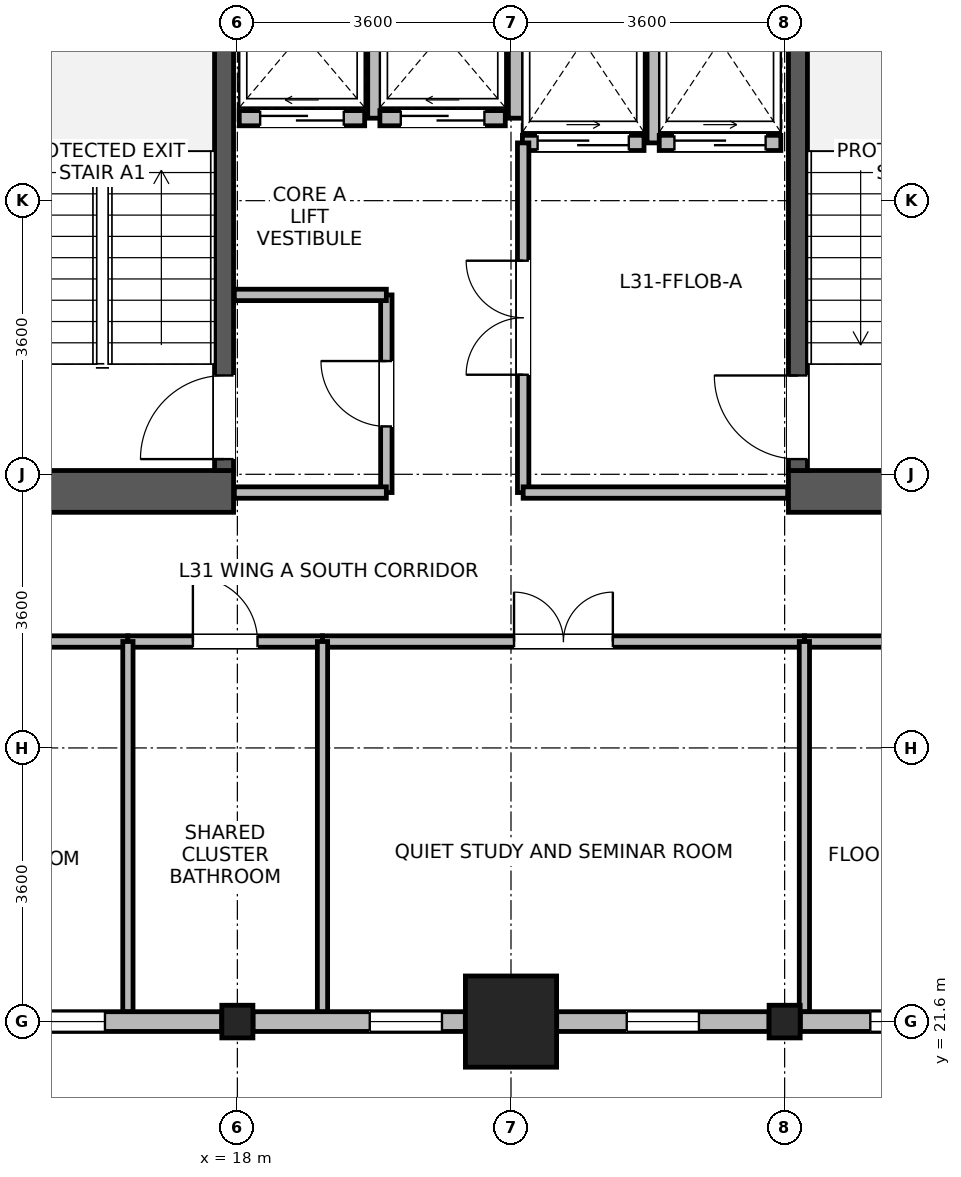
"""IFC4 building model, lengths in metres.
Left out: names, types, materials, properties, quantities, classifications, styles, units other than length and angle.
Written with IfcOpenShell. Run it as: python <this file> out.ifc"""

import sys

from ifc_helpers import new_model, si_unit, direction, frame, frame_2d, origin, origin_2d, place, context, subcontext, project, spatial, rectangle, i_section, extrude, source, transform, mapped, element, fill, save


model = new_model("IFC4")
c1 = context("Model", 3, precision=1e-05, world=origin(), true_north=direction((0.0, 1.0)))
c2 = subcontext(c1, "Body", "Model", "MODEL_VIEW")
j1 = project(units=[si_unit("LENGTHUNIT", "METRE"), si_unit("PLANEANGLEUNIT", "RADIAN")], contexts=[c1])
p1 = place(None, origin())
s1 = spatial("IfcSite", under=j1, at=p1, CompositionType="ELEMENT")
p2 = place(p1, origin())
s2 = spatial("IfcBuilding", under=s1, at=p2, CompositionType="ELEMENT")
p3 = place(p2, frame((0.0, 0.0, 123.0)))
s3 = spatial("IfcBuildingStorey", under=s2, at=p3, CompositionType="ELEMENT", Elevation=123.0)
for number, where, z_axis, x_axis in (
    (1, (14.75, 28.575, 0.0), (0.0, 0.0, 1.0), (1.0, 0.0, 0.0)),
    (2, (25.25, 28.575, 0.0), (0.0, 0.0, 1.0), (1.0, 0.0, 0.0)),
):
    element("IfcWall", number, at=place(p3, frame(where, z_axis=z_axis, x_axis=x_axis)), inside=s3, PredefinedType="SHEAR", context=c2, shape_type="SweptSolid", body=[
        extrude(rectangle(XDim=3.2, YDim=0.55, at=frame_2d((1.6, 0.0))), origin(), (0.0, 0.0, 1.0), 3.45),
    ])
p4 = place(p3, frame((17.825, 28.85, 0.0), z_axis=(0.0, 0.0, 1.0), x_axis=(0.0, 1.0, 0.0)))
e3 = element("IfcWall", 3, at=p4, inside=s3, PredefinedType="SHEAR", context=c2, shape_type="SweptSolid", body=[
    extrude(rectangle(XDim=7.0, YDim=0.25, at=frame_2d((3.5, 0.0))), origin(), (0.0, 0.0, 1.0), 3.45),
])
p5 = place(p4, frame((0.15, 0.0, 0.0)))
e4 = element("IfcOpeningElement", 4, at=p5, cuts=e3, PredefinedType="OPENING", context=c2, shape_type="SweptSolid", body=[
    extrude(rectangle(XDim=1.1, YDim=2.08, at=frame_2d((0.55, 1.04))), frame((0.0, 0.135, 0.0), z_axis=(0.0, -1.0, 0.0), x_axis=(1.0, 0.0, 0.0)), (0.0, 0.0, 1.0), 0.27),
])
p6 = place(p3, frame((25.375, 28.85, 0.0), z_axis=(0.0, 0.0, 1.0), x_axis=(0.0, 1.0, 0.0)))
e5 = element("IfcWall", 5, at=p6, inside=s3, PredefinedType="SHEAR", context=c2, shape_type="SweptSolid", body=[
    extrude(rectangle(XDim=7.0, YDim=0.25, at=frame_2d((3.5, 0.0))), origin(), (0.0, 0.0, 1.0), 3.45),
])
p7 = place(p6, frame((0.15, 0.0, 0.0)))
e6 = element("IfcOpeningElement", 6, at=p7, cuts=e5, PredefinedType="OPENING", context=c2, shape_type="SweptSolid", body=[
    extrude(rectangle(XDim=1.1, YDim=2.08, at=frame_2d((0.55, 1.04))), frame((0.0, 0.135, 0.0), z_axis=(0.0, -1.0, 0.0), x_axis=(1.0, 0.0, 0.0)), (0.0, 0.0, 1.0), 0.27),
])
m1 = source(origin(), c2, "Body", "SweptSolid", [
    extrude(rectangle(XDim=1.2, YDim=1.2, at=origin_2d()), origin(), (0.0, 0.0, 1.0), 3.7),
])
p8 = place(p3, frame((21.6, 21.6, 0.0), z_axis=(0.0, 0.0, 1.0), x_axis=(1.0, 0.0, 0.0)))
e7 = element("IfcColumn", 7, at=p8, inside=s3, PredefinedType="COLUMN", context=c2, shape_type="MappedRepresentation", body=[
    mapped(m1, transform((0.0, 0.0, 0.0), x_axis=(1.0, 0.0, 0.0), y_axis=(0.0, 1.0, 0.0), z_axis=(0.0, 0.0, 1.0), scale=1.0)),
])
m2 = source(origin(), c2, "Body", "SweptSolid", [
    extrude(i_section(OverallWidth=0.409, OverallDepth=0.43, WebThickness=0.024, FlangeThickness=0.033, FilletRadius=0.015, at=origin_2d()), origin(), (0.0, 0.0, 1.0), 3.7),
])
for number, where, z_axis, x_axis in (
    (8, (18.0, 21.6, 0.0), (0.0, 0.0, 1.0), (1.0, 0.0, 0.0)),
    (9, (25.2, 21.6, 0.0), (0.0, 0.0, 1.0), (1.0, 0.0, 0.0)),
):
    element("IfcColumn", number, at=place(p3, frame(where, z_axis=z_axis, x_axis=x_axis)), inside=s3, PredefinedType="COLUMN", context=c2, shape_type="MappedRepresentation", body=[
        mapped(m2, transform((0.0, 0.0, 0.0), x_axis=(1.0, 0.0, 0.0), y_axis=(0.0, 1.0, 0.0), z_axis=(0.0, 0.0, 1.0), scale=1.0)),
    ])
p9 = place(p3, frame((17.794, 21.6, 0.0), z_axis=(0.0, 0.0, 1.0), x_axis=(-1.0, 0.0, 0.0)))
e10 = element("IfcWall", 10, at=p9, inside=s3, PredefinedType="STANDARD", context=c2, shape_type="SweptSolid", body=[
    extrude(rectangle(XDim=2.793, YDim=0.26, at=frame_2d((1.397, 0.0))), origin(), (0.0, 0.0, 1.0), 2.98),
])
p10 = place(p9, frame((1.536, 0.0, 0.85)))
e11 = element("IfcOpeningElement", 11, at=p10, cuts=e10, PredefinedType="OPENING", context=c2, shape_type="SweptSolid", body=[
    extrude(rectangle(XDim=0.95, YDim=1.75, at=frame_2d((0.475, 0.875))), frame((0.0, 0.14, 0.0), z_axis=(0.0, -1.0, 0.0), x_axis=(1.0, 0.0, 0.0)), (0.0, 0.0, 1.0), 0.28),
])
p11 = place(p3, frame((20.999, 21.6, 0.0), z_axis=(0.0, 0.0, 1.0), x_axis=(-1.0, 0.0, 0.0)))
e12 = element("IfcWall", 12, at=p11, inside=s3, PredefinedType="STANDARD", context=c2, shape_type="SweptSolid", body=[
    extrude(rectangle(XDim=2.793, YDim=0.26, at=frame_2d((1.397, 0.0))), origin(), (0.0, 0.0, 1.0), 2.98),
])
p12 = place(p11, frame((0.307, 0.0, 0.85)))
e13 = element("IfcOpeningElement", 13, at=p12, cuts=e12, PredefinedType="OPENING", context=c2, shape_type="SweptSolid", body=[
    extrude(rectangle(XDim=0.95, YDim=1.75, at=frame_2d((0.475, 0.875))), frame((0.0, 0.14, 0.0), z_axis=(0.0, -1.0, 0.0), x_axis=(1.0, 0.0, 0.0)), (0.0, 0.0, 1.0), 0.28),
])
p13 = place(p3, frame((24.994, 21.6, 0.0), z_axis=(0.0, 0.0, 1.0), x_axis=(-1.0, 0.0, 0.0)))
e14 = element("IfcWall", 14, at=p13, inside=s3, PredefinedType="STANDARD", context=c2, shape_type="SweptSolid", body=[
    extrude(rectangle(XDim=2.793, YDim=0.26, at=frame_2d((1.397, 0.0))), origin(), (0.0, 0.0, 1.0), 2.98),
])
p14 = place(p13, frame((0.922, 0.0, 0.85)))
e15 = element("IfcOpeningElement", 15, at=p14, cuts=e14, PredefinedType="OPENING", context=c2, shape_type="SweptSolid", body=[
    extrude(rectangle(XDim=0.95, YDim=1.75, at=frame_2d((0.475, 0.875))), frame((0.0, 0.14, 0.0), z_axis=(0.0, -1.0, 0.0), x_axis=(1.0, 0.0, 0.0)), (0.0, 0.0, 1.0), 0.28),
])
p15 = place(p3, frame((28.199, 21.6, 0.0), z_axis=(0.0, 0.0, 1.0), x_axis=(-1.0, 0.0, 0.0)))
e16 = element("IfcWall", 16, at=p15, inside=s3, PredefinedType="STANDARD", context=c2, shape_type="SweptSolid", body=[
    extrude(rectangle(XDim=2.793, YDim=0.26, at=frame_2d((1.397, 0.0))), origin(), (0.0, 0.0, 1.0), 2.98),
])
p16 = place(p15, frame((0.922, 0.0, 0.85)))
e17 = element("IfcOpeningElement", 17, at=p16, cuts=e16, PredefinedType="OPENING", context=c2, shape_type="SweptSolid", body=[
    extrude(rectangle(XDim=0.95, YDim=1.75, at=frame_2d((0.475, 0.875))), frame((0.0, 0.14, 0.0), z_axis=(0.0, -1.0, 0.0), x_axis=(1.0, 0.0, 0.0)), (0.0, 0.0, 1.0), 0.28),
])
p17 = place(p3, frame((18.025, 33.485, 0.0), z_axis=(0.0, 0.0, 1.0), x_axis=(1.0, 0.0, 0.0)))
e18 = element("IfcWall", 18, at=p17, inside=s3, PredefinedType="PARTITIONING", context=c2, shape_type="SweptSolid", body=[
    extrude(rectangle(XDim=1.65, YDim=0.2, at=frame_2d((0.825, 0.0))), origin(), (0.0, 0.0, 1.0), 3.43),
])
p18 = place(p17, frame((0.275, 0.0, 0.0)))
e19 = element("IfcOpeningElement", 19, at=p18, cuts=e18, PredefinedType="OPENING", context=c2, shape_type="SweptSolid", body=[
    extrude(rectangle(XDim=1.1, YDim=2.12, at=frame_2d((0.55, 1.06))), frame((0.0, 0.11, 0.0), z_axis=(0.0, -1.0, 0.0), x_axis=(1.0, 0.0, 0.0)), (0.0, 0.0, 1.0), 0.22),
])
p19 = place(p3, frame((19.815, 33.485, 0.0), z_axis=(0.0, 0.0, 1.0), x_axis=(0.0, 1.0, 0.0)))
e20 = element("IfcWall", 20, at=p19, inside=s3, PredefinedType="PARTITIONING", context=c2, shape_type="SweptSolid", body=[
    extrude(rectangle(XDim=2.23, YDim=0.2, at=frame_2d((1.115, 0.0))), origin(), (0.0, 0.0, 1.0), 3.43),
])
p20 = place(p3, frame((19.875, 33.485, 0.0), z_axis=(0.0, 0.0, 1.0), x_axis=(1.0, 0.0, 0.0)))
e21 = element("IfcWall", 21, at=p20, inside=s3, PredefinedType="PARTITIONING", context=c2, shape_type="SweptSolid", body=[
    extrude(rectangle(XDim=1.65, YDim=0.2, at=frame_2d((0.825, 0.0))), origin(), (0.0, 0.0, 1.0), 3.43),
])
p21 = place(p20, frame((0.275, 0.0, 0.0)))
e22 = element("IfcOpeningElement", 22, at=p21, cuts=e21, PredefinedType="OPENING", context=c2, shape_type="SweptSolid", body=[
    extrude(rectangle(XDim=1.1, YDim=2.12, at=frame_2d((0.55, 1.06))), frame((0.0, 0.11, 0.0), z_axis=(0.0, -1.0, 0.0), x_axis=(1.0, 0.0, 0.0)), (0.0, 0.0, 1.0), 0.22),
])
p22 = place(p3, frame((21.665, 33.485, 0.0), z_axis=(0.0, 0.0, 1.0), x_axis=(0.0, 1.0, 0.0)))
e23 = element("IfcWall", 23, at=p22, inside=s3, PredefinedType="PARTITIONING", context=c2, shape_type="SweptSolid", body=[
    extrude(rectangle(XDim=2.23, YDim=0.2, at=frame_2d((1.115, 0.0))), origin(), (0.0, 0.0, 1.0), 3.43),
])
p23 = place(p3, frame((21.75, 33.16, 0.0), z_axis=(0.0, 0.0, 1.0), x_axis=(1.0, 0.0, 0.0)))
e24 = element("IfcWall", 24, at=p23, inside=s3, PredefinedType="PARTITIONING", context=c2, shape_type="SweptSolid", body=[
    extrude(rectangle(XDim=1.6, YDim=0.2, at=frame_2d((0.8, 0.0))), origin(), (0.0, 0.0, 1.0), 3.43),
])
p24 = place(p23, frame((0.2, 0.0, 0.0)))
e25 = element("IfcOpeningElement", 25, at=p24, cuts=e24, PredefinedType="OPENING", context=c2, shape_type="SweptSolid", body=[
    extrude(rectangle(XDim=1.2, YDim=2.12, at=frame_2d((0.6, 1.06))), frame((0.0, 0.11, 0.0), z_axis=(0.0, -1.0, 0.0), x_axis=(1.0, 0.0, 0.0)), (0.0, 0.0, 1.0), 0.22),
])
p25 = place(p3, frame((23.49, 33.16, 0.0), z_axis=(0.0, 0.0, 1.0), x_axis=(0.0, 1.0, 0.0)))
e26 = element("IfcWall", 26, at=p25, inside=s3, PredefinedType="PARTITIONING", context=c2, shape_type="SweptSolid", body=[
    extrude(rectangle(XDim=2.68, YDim=0.2, at=frame_2d((1.34, 0.0))), origin(), (0.0, 0.0, 1.0), 3.43),
])
p26 = place(p3, frame((23.55, 33.16, 0.0), z_axis=(0.0, 0.0, 1.0), x_axis=(1.0, 0.0, 0.0)))
e27 = element("IfcWall", 27, at=p26, inside=s3, PredefinedType="PARTITIONING", context=c2, shape_type="SweptSolid", body=[
    extrude(rectangle(XDim=1.6, YDim=0.2, at=frame_2d((0.8, 0.0))), origin(), (0.0, 0.0, 1.0), 3.43),
])
p27 = place(p26, frame((0.2, 0.0, 0.0)))
e28 = element("IfcOpeningElement", 28, at=p27, cuts=e27, PredefinedType="OPENING", context=c2, shape_type="SweptSolid", body=[
    extrude(rectangle(XDim=1.2, YDim=2.12, at=frame_2d((0.6, 1.06))), frame((0.0, 0.11, 0.0), z_axis=(0.0, -1.0, 0.0), x_axis=(1.0, 0.0, 0.0)), (0.0, 0.0, 1.0), 0.22),
])
p28 = place(p3, frame((19.12, 26.6, 0.0), z_axis=(0.0, 0.0, 1.0), x_axis=(1.0, 0.0, 0.0)))
e29 = element("IfcWall", 29, at=p28, inside=s3, PredefinedType="PARTITIONING", context=c2, shape_type="SweptSolid", body=[
    extrude(rectangle(XDim=6.34, YDim=0.15, at=frame_2d((3.17, 0.0))), origin(), (0.0, 0.0, 1.0), 3.43),
])
p29 = place(p28, frame((2.52, 0.0, 0.0)))
e30 = element("IfcOpeningElement", 30, at=p29, cuts=e29, PredefinedType="OPENING", context=c2, shape_type="SweptSolid", body=[
    extrude(rectangle(XDim=1.3, YDim=2.12, at=frame_2d((0.65, 1.06))), frame((0.0, 0.085, 0.0), z_axis=(0.0, -1.0, 0.0), x_axis=(1.0, 0.0, 0.0)), (0.0, 0.0, 1.0), 0.17),
])
p30 = place(p3, frame((11.44, 26.6, 0.0), z_axis=(0.0, 0.0, 1.0), x_axis=(1.0, 0.0, 0.0)))
e31 = element("IfcWall", 31, at=p30, inside=s3, PredefinedType="PARTITIONING", context=c2, shape_type="SweptSolid", body=[
    extrude(rectangle(XDim=5.12, YDim=0.15, at=frame_2d((2.56, 0.0))), origin(), (0.0, 0.0, 1.0), 3.43),
])
p31 = place(p30, frame((2.085, 0.0, 0.0)))
e32 = element("IfcOpeningElement", 32, at=p31, cuts=e31, PredefinedType="OPENING", context=c2, shape_type="SweptSolid", body=[
    extrude(rectangle(XDim=0.95, YDim=2.1, at=frame_2d((0.475, 1.05))), frame((0.0, 0.085, 0.0), z_axis=(0.0, -1.0, 0.0), x_axis=(1.0, 0.0, 0.0)), (0.0, 0.0, 1.0), 0.17),
])
p32 = place(p3, frame((25.46, 26.6, 0.0), z_axis=(0.0, 0.0, 1.0), x_axis=(1.0, 0.0, 0.0)))
e33 = element("IfcWall", 33, at=p32, inside=s3, PredefinedType="PARTITIONING", context=c2, shape_type="SweptSolid", body=[
    extrude(rectangle(XDim=4.98, YDim=0.15, at=frame_2d((2.49, 0.0))), origin(), (0.0, 0.0, 1.0), 3.43),
])
p33 = place(p32, frame((2.065, 0.0, 0.0)))
e34 = element("IfcOpeningElement", 34, at=p33, cuts=e33, PredefinedType="OPENING", context=c2, shape_type="SweptSolid", body=[
    extrude(rectangle(XDim=0.85, YDim=2.04, at=frame_2d((0.425, 1.02))), frame((0.0, 0.085, 0.0), z_axis=(0.0, -1.0, 0.0), x_axis=(1.0, 0.0, 0.0)), (0.0, 0.0, 1.0), 0.17),
])
p34 = place(p3, frame((19.96, 28.56, 0.0), z_axis=(0.0, 0.0, 1.0), x_axis=(0.0, 1.0, 0.0)))
e35 = element("IfcWall", 35, at=p34, inside=s3, PredefinedType="PARTITIONING", context=c2, shape_type="SweptSolid", body=[
    extrude(rectangle(XDim=2.6, YDim=0.15, at=frame_2d((1.3, 0.0))), origin(), (0.0, 0.0, 1.0), 3.43),
])
p35 = place(p34, frame((0.87, 0.0, 0.0)))
e36 = element("IfcOpeningElement", 36, at=p35, cuts=e35, PredefinedType="OPENING", context=c2, shape_type="SweptSolid", body=[
    extrude(rectangle(XDim=0.86, YDim=2.02, at=frame_2d((0.43, 1.01))), frame((0.0, 0.085, 0.0), z_axis=(0.0, -1.0, 0.0), x_axis=(1.0, 0.0, 0.0)), (0.0, 0.0, 1.0), 0.17),
])
p36 = place(p3, frame((16.56, 26.6, 0.0), z_axis=(0.0, 0.0, 1.0), x_axis=(1.0, 0.0, 0.0)))
e37 = element("IfcWall", 37, at=p36, inside=s3, PredefinedType="PARTITIONING", context=c2, shape_type="SweptSolid", body=[
    extrude(rectangle(XDim=2.56, YDim=0.15, at=frame_2d((1.28, 0.0))), origin(), (0.0, 0.0, 1.0), 3.43),
])
p37 = place(p36, frame((0.855, 0.0, 0.0)))
e38 = element("IfcOpeningElement", 38, at=p37, cuts=e37, PredefinedType="OPENING", context=c2, shape_type="SweptSolid", body=[
    extrude(rectangle(XDim=0.85, YDim=2.04, at=frame_2d((0.425, 1.02))), frame((0.0, 0.085, 0.0), z_axis=(0.0, -1.0, 0.0), x_axis=(1.0, 0.0, 0.0)), (0.0, 0.0, 1.0), 0.17),
])
p38 = place(p3, frame((17.96, 28.56, 0.0), z_axis=(0.0, 0.0, 1.0), x_axis=(1.0, 0.0, 0.0)))
e39 = element("IfcWall", 39, at=p38, inside=s3, PredefinedType="PARTITIONING", context=c2, shape_type="SweptSolid", body=[
    extrude(rectangle(XDim=2.0, YDim=0.15, at=frame_2d((1.0, 0.0))), origin(), (0.0, 0.0, 1.0), 2.43),
])
p39 = place(p3, frame((17.96, 31.16, 0.0), z_axis=(0.0, 0.0, 1.0), x_axis=(1.0, 0.0, 0.0)))
e40 = element("IfcWall", 40, at=p39, inside=s3, PredefinedType="PARTITIONING", context=c2, shape_type="SweptSolid", body=[
    extrude(rectangle(XDim=2.0, YDim=0.15, at=frame_2d((1.0, 0.0))), origin(), (0.0, 0.0, 1.0), 3.43),
])
for number, where, z_axis, x_axis in (
    (41, (16.56, 21.732, 0.0), (0.0, 0.0, 1.0), (0.0, 1.0, 0.0)),
    (42, (19.12, 21.732, 0.0), (0.0, 0.0, 1.0), (0.0, 1.0, 0.0)),
    (43, (25.46, 21.732, 0.0), (0.0, 0.0, 1.0), (0.0, 1.0, 0.0)),
):
    element("IfcWall", number, at=place(p3, frame(where, z_axis=z_axis, x_axis=x_axis)), inside=s3, PredefinedType="PARTITIONING", context=c2, shape_type="SweptSolid", body=[
        extrude(rectangle(XDim=4.868, YDim=0.135, at=frame_2d((2.434, 0.0))), origin(), (0.0, 0.0, 1.0), 3.43),
    ])
p40 = place(p3, frame((21.76, 28.56, 0.0), z_axis=(0.0, 0.0, 1.0), x_axis=(0.0, 1.0, 0.0)))
e44 = element("IfcWall", 44, at=p40, inside=s3, PredefinedType="PARTITIONING", context=c2, shape_type="SweptSolid", body=[
    extrude(rectangle(XDim=4.6, YDim=0.15, at=frame_2d((2.3, 0.0))), origin(), (0.0, 0.0, 1.0), 3.43),
])
p41 = place(p40, frame((1.55, 0.0, 0.0)))
e45 = element("IfcOpeningElement", 45, at=p41, cuts=e44, PredefinedType="OPENING", context=c2, shape_type="SweptSolid", body=[
    extrude(rectangle(XDim=1.5, YDim=2.1, at=frame_2d((0.75, 1.05))), frame((0.0, 0.085, 0.0), z_axis=(0.0, -1.0, 0.0), x_axis=(1.0, 0.0, 0.0)), (0.0, 0.0, 1.0), 0.17),
])
p42 = place(p3, frame((21.76, 28.56, 0.0), z_axis=(0.0, 0.0, 1.0), x_axis=(1.0, 0.0, 0.0)))
e46 = element("IfcWall", 46, at=p42, inside=s3, PredefinedType="PARTITIONING", context=c2, shape_type="SweptSolid", body=[
    extrude(rectangle(XDim=3.48, YDim=0.15, at=frame_2d((1.74, 0.0))), origin(), (0.0, 0.0, 1.0), 2.43),
])
p43 = place(p10, origin())
e47 = element("IfcWindow", 47, at=p43, inside=s3, PartitioningType="SINGLE_PANEL", PredefinedType="WINDOW", context=c2, shape_type="SweptSolid", body=[
    extrude(rectangle(XDim=0.95, YDim=1.75, at=frame_2d((0.475, 0.875))), frame((0.0, 0.03, 0.0), z_axis=(0.0, -1.0, 0.0), x_axis=(1.0, 0.0, 0.0)), (0.0, 0.0, 1.0), 0.06),
])
fill(e11, e47)
p44 = place(p12, origin())
e48 = element("IfcWindow", 48, at=p44, inside=s3, PartitioningType="SINGLE_PANEL", PredefinedType="WINDOW", context=c2, shape_type="SweptSolid", body=[
    extrude(rectangle(XDim=0.95, YDim=1.75, at=frame_2d((0.475, 0.875))), frame((0.0, 0.03, 0.0), z_axis=(0.0, -1.0, 0.0), x_axis=(1.0, 0.0, 0.0)), (0.0, 0.0, 1.0), 0.06),
])
fill(e13, e48)
p45 = place(p14, origin())
e49 = element("IfcWindow", 49, at=p45, inside=s3, PartitioningType="SINGLE_PANEL", PredefinedType="WINDOW", context=c2, shape_type="SweptSolid", body=[
    extrude(rectangle(XDim=0.95, YDim=1.75, at=frame_2d((0.475, 0.875))), frame((0.0, 0.03, 0.0), z_axis=(0.0, -1.0, 0.0), x_axis=(1.0, 0.0, 0.0)), (0.0, 0.0, 1.0), 0.06),
])
fill(e15, e49)
p46 = place(p16, origin())
e50 = element("IfcWindow", 50, at=p46, inside=s3, PartitioningType="SINGLE_PANEL", PredefinedType="WINDOW", context=c2, shape_type="SweptSolid", body=[
    extrude(rectangle(XDim=0.95, YDim=1.75, at=frame_2d((0.475, 0.875))), frame((0.0, 0.03, 0.0), z_axis=(0.0, -1.0, 0.0), x_axis=(1.0, 0.0, 0.0)), (0.0, 0.0, 1.0), 0.06),
])
fill(e17, e50)
p47 = place(p5, origin())
e51 = element("IfcDoor", 51, at=p47, inside=s3, OperationType="SINGLE_SWING_LEFT", PredefinedType="DOOR", context=c2, shape_type="SweptSolid", body=[
    extrude(rectangle(XDim=1.1, YDim=2.08, at=frame_2d((0.55, 1.04))), frame((0.0, 0.025, 0.0), z_axis=(0.0, -1.0, 0.0), x_axis=(1.0, 0.0, 0.0)), (0.0, 0.0, 1.0), 0.05),
])
fill(e4, e51)
p48 = place(p7, origin())
e52 = element("IfcDoor", 52, at=p48, inside=s3, OperationType="SINGLE_SWING_RIGHT", PredefinedType="DOOR", context=c2, shape_type="SweptSolid", body=[
    extrude(rectangle(XDim=1.1, YDim=2.08, at=frame_2d((0.55, 1.04))), frame((0.0, 0.025, 0.0), z_axis=(0.0, -1.0, 0.0), x_axis=(1.0, 0.0, 0.0)), (0.0, 0.0, 1.0), 0.05),
])
fill(e6, e52)
p49 = place(p18, origin())
e53 = element("IfcDoor", 53, at=p49, inside=s3, OperationType="SLIDING_TO_LEFT", PredefinedType="DOOR", context=c2, shape_type="SweptSolid", body=[
    extrude(rectangle(XDim=1.1, YDim=2.12, at=frame_2d((0.55, 1.06))), frame((0.0, 0.025, 0.0), z_axis=(0.0, -1.0, 0.0), x_axis=(1.0, 0.0, 0.0)), (0.0, 0.0, 1.0), 0.05),
])
fill(e19, e53)
p50 = place(p21, origin())
e54 = element("IfcDoor", 54, at=p50, inside=s3, OperationType="SLIDING_TO_LEFT", PredefinedType="DOOR", context=c2, shape_type="SweptSolid", body=[
    extrude(rectangle(XDim=1.1, YDim=2.12, at=frame_2d((0.55, 1.06))), frame((0.0, 0.025, 0.0), z_axis=(0.0, -1.0, 0.0), x_axis=(1.0, 0.0, 0.0)), (0.0, 0.0, 1.0), 0.05),
])
fill(e22, e54)
p51 = place(p24, origin())
e55 = element("IfcDoor", 55, at=p51, inside=s3, OperationType="SLIDING_TO_RIGHT", PredefinedType="DOOR", context=c2, shape_type="SweptSolid", body=[
    extrude(rectangle(XDim=1.2, YDim=2.12, at=frame_2d((0.6, 1.06))), frame((0.0, 0.025, 0.0), z_axis=(0.0, -1.0, 0.0), x_axis=(1.0, 0.0, 0.0)), (0.0, 0.0, 1.0), 0.05),
])
fill(e25, e55)
p52 = place(p27, origin())
e56 = element("IfcDoor", 56, at=p52, inside=s3, OperationType="SLIDING_TO_RIGHT", PredefinedType="DOOR", context=c2, shape_type="SweptSolid", body=[
    extrude(rectangle(XDim=1.2, YDim=2.12, at=frame_2d((0.6, 1.06))), frame((0.0, 0.025, 0.0), z_axis=(0.0, -1.0, 0.0), x_axis=(1.0, 0.0, 0.0)), (0.0, 0.0, 1.0), 0.05),
])
fill(e28, e56)
p53 = place(p29, origin())
e57 = element("IfcDoor", 57, at=p53, inside=s3, OperationType="DOUBLE_DOOR_SINGLE_SWING", PredefinedType="DOOR", context=c2, shape_type="SweptSolid", body=[
    extrude(rectangle(XDim=1.3, YDim=2.12, at=frame_2d((0.65, 1.06))), frame((0.0, 0.025, 0.0), z_axis=(0.0, -1.0, 0.0), x_axis=(1.0, 0.0, 0.0)), (0.0, 0.0, 1.0), 0.05),
])
fill(e30, e57)
p54 = place(p35, origin())
e58 = element("IfcDoor", 58, at=p54, inside=s3, OperationType="SINGLE_SWING_RIGHT", PredefinedType="DOOR", context=c2, shape_type="SweptSolid", body=[
    extrude(rectangle(XDim=0.86, YDim=2.02, at=frame_2d((0.43, 1.01))), frame((0.0, 0.025, 0.0), z_axis=(0.0, -1.0, 0.0), x_axis=(1.0, 0.0, 0.0)), (0.0, 0.0, 1.0), 0.05),
])
fill(e36, e58)
p55 = place(p37, origin())
e59 = element("IfcDoor", 59, at=p55, inside=s3, OperationType="SINGLE_SWING_LEFT", PredefinedType="DOOR", context=c2, shape_type="SweptSolid", body=[
    extrude(rectangle(XDim=0.85, YDim=2.04, at=frame_2d((0.425, 1.02))), frame((0.0, 0.025, 0.0), z_axis=(0.0, -1.0, 0.0), x_axis=(1.0, 0.0, 0.0)), (0.0, 0.0, 1.0), 0.05),
])
fill(e38, e59)
p56 = place(p41, origin())
e60 = element("IfcDoor", 60, at=p56, inside=s3, OperationType="DOUBLE_DOOR_SINGLE_SWING", PredefinedType="DOOR", context=c2, shape_type="SweptSolid", body=[
    extrude(rectangle(XDim=1.5, YDim=2.1, at=frame_2d((0.75, 1.05))), frame((0.0, 0.025, 0.0), z_axis=(0.0, -1.0, 0.0), x_axis=(1.0, 0.0, 0.0)), (0.0, 0.0, 1.0), 0.05),
])
fill(e45, e60)
save(model, sys.argv[1])
